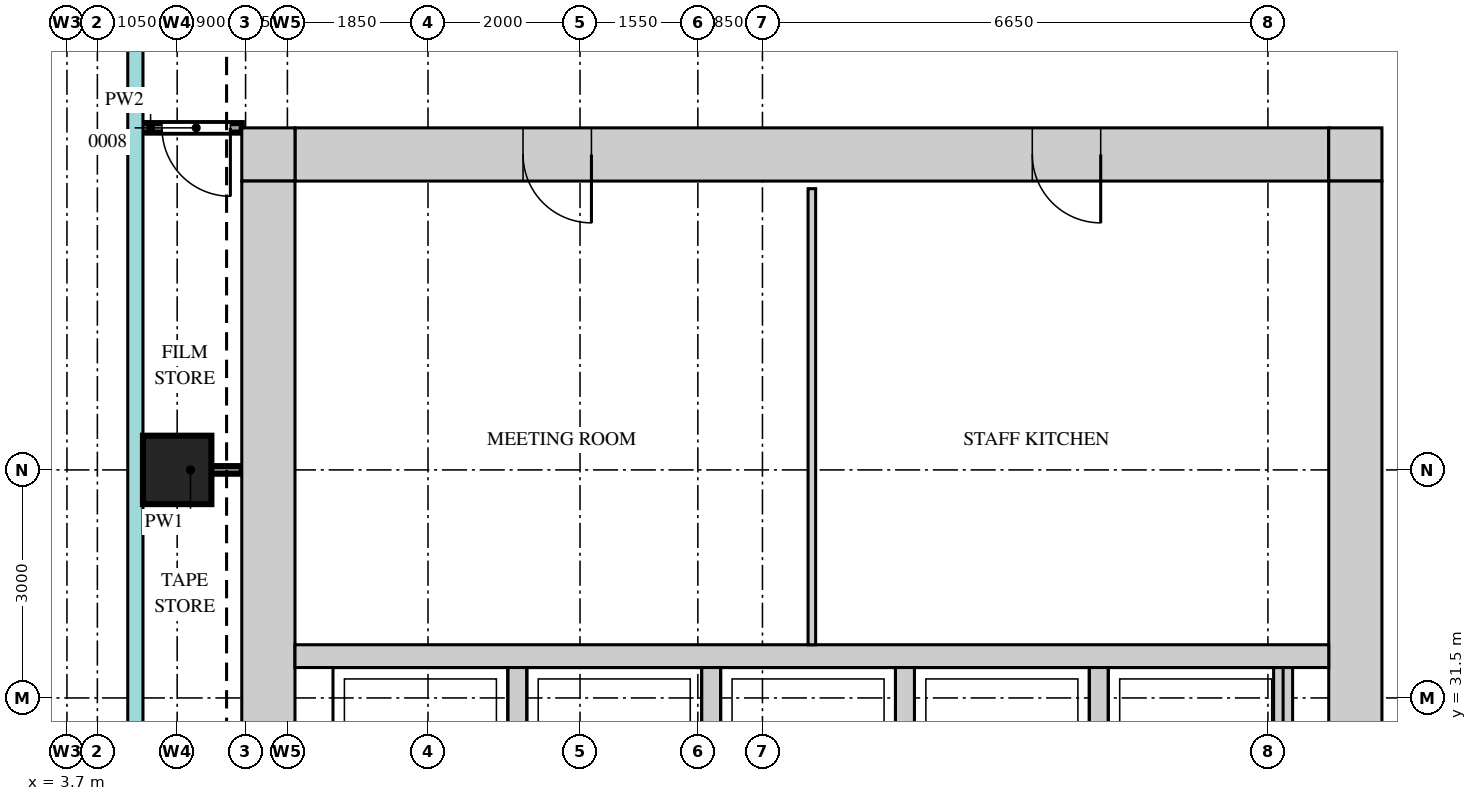
"""IFC4 building model, lengths in metres.
Left out: names, types, materials, properties, quantities, classifications, styles, units other than length and angle.
Written with IfcOpenShell. Run it as: python <this file> out.ifc"""

import sys

from ifc_helpers import new_model, si_unit, direction, frame, frame_2d, origin, origin_2d, place, context, subcontext, project, spatial, rectangle, extrude, source, transform, mapped, element, fill, save


model = new_model("IFC4")
c1 = context("Model", 3, precision=1e-05, world=origin(), true_north=direction((0.0, 1.0)))
c2 = subcontext(c1, "Body", "Model", "MODEL_VIEW")
j1 = project(units=[si_unit("LENGTHUNIT", "METRE"), si_unit("PLANEANGLEUNIT", "RADIAN")], contexts=[c1])
p1 = place(None, origin())
s1 = spatial("IfcSite", under=j1, at=p1, CompositionType="ELEMENT")
p2 = place(p1, origin())
s2 = spatial("IfcBuilding", under=s1, at=p2, CompositionType="ELEMENT")
p3 = place(p2, frame((0.0, 0.0, 254.2)))
s3 = spatial("IfcBuildingStorey", under=s2, at=p3, CompositionType="ELEMENT", Elevation=254.2)
m1 = source(origin(), c2, "Body", "SweptSolid", [
    extrude(rectangle(XDim=13.6, YDim=0.7, at=frame_2d((6.8, 0.0))), origin(), (0.0, 0.0, 1.0), 3.75),
])
p4 = place(p3, frame((6.7, 38.65, 0.0), z_axis=(0.0, 0.0, 1.0), x_axis=(1.0, 0.0, 0.0)))
e1 = element("IfcWall", 1, at=p4, inside=s3, PredefinedType="SHEAR", context=c2, shape_type="MappedRepresentation", body=[
    mapped(m1, transform((0.0, 0.0, 0.0))),
])
m2 = source(origin(), c2, "Body", "SweptSolid", [
    extrude(rectangle(XDim=0.9, YDim=2.1, at=frame_2d((0.45, 1.05))), frame((0.0, 0.36, 0.0), z_axis=(0.0, -1.0, 0.0), x_axis=(1.0, 0.0, 0.0)), (0.0, 0.0, 1.0), 0.72),
])
p5 = place(p4, frame((3.0, 0.0, 0.0)))
e2 = element("IfcOpeningElement", 2, at=p5, cuts=e1, PredefinedType="OPENING", context=c2, shape_type="MappedRepresentation", body=[
    mapped(m2, transform((0.0, 0.0, 0.0))),
])
p6 = place(p4, frame((9.7, 0.0, 0.0)))
e3 = element("IfcOpeningElement", 3, at=p6, cuts=e1, PredefinedType="OPENING", context=c2, shape_type="MappedRepresentation", body=[
    mapped(m2, transform((0.0, 0.0, 0.0))),
])
m3 = source(origin(), c2, "Body", "SweptSolid", [
    extrude(rectangle(XDim=0.7, YDim=0.7, at=frame_2d((0.35, 0.0))), origin(), (0.0, 0.0, 1.0), 3.75),
])
for number, where, z_axis, x_axis in (
    (4, (20.3, 38.65, 0.0), (0.0, 0.0, 1.0), (1.0, 0.0, 0.0)),
    (5, (6.0, 38.65, 0.0), (0.0, 0.0, 1.0), (1.0, 0.0, 0.0)),
):
    element("IfcWall", number, at=place(p3, frame(where, z_axis=z_axis, x_axis=x_axis)), inside=s3, PredefinedType="SHEAR", context=c2, shape_type="MappedRepresentation", body=[
        mapped(m3, transform((0.0, 0.0, 0.0))),
    ])
m4 = source(origin(), c2, "Body", "SweptSolid", [
    extrude(rectangle(XDim=22.6, YDim=0.7, at=frame_2d((11.3, 0.0))), origin(), (0.0, 0.0, 1.0), 3.75),
])
p7 = place(p3, frame((20.65, 15.7, 0.0), z_axis=(0.0, 0.0, 1.0), x_axis=(0.0, 1.0, 0.0)))
e6 = element("IfcWall", 6, at=p7, inside=s3, PredefinedType="SHEAR", context=c2, shape_type="MappedRepresentation", body=[
    mapped(m4, transform((0.0, 0.0, 0.0))),
])
m5 = source(origin(), c2, "Body", "SweptSolid", [
    extrude(rectangle(XDim=1.8, YDim=2.1, at=frame_2d((0.9, 1.05))), frame((0.0, 0.36, 0.0), z_axis=(0.0, -1.0, 0.0), x_axis=(1.0, 0.0, 0.0)), (0.0, 0.0, 1.0), 0.72),
])
p8 = place(p7, frame((10.8, 0.0, 0.0)))
e7 = element("IfcOpeningElement", 7, at=p8, cuts=e6, PredefinedType="OPENING", context=c2, shape_type="MappedRepresentation", body=[
    mapped(m5, transform((0.0, 0.0, 0.0))),
])
p9 = place(p7, frame((0.45, 0.0, 0.0)))
e8 = element("IfcOpeningElement", 8, at=p9, cuts=e6, PredefinedType="OPENING", context=c2, shape_type="MappedRepresentation", body=[
    mapped(m2, transform((0.0, 0.0, 0.0))),
])
p10 = place(p7, frame((2.9, 0.0, 0.0)))
e9 = element("IfcOpeningElement", 9, at=p10, cuts=e6, PredefinedType="OPENING", context=c2, shape_type="MappedRepresentation", body=[
    mapped(m2, transform((0.0, 0.0, 0.0))),
])
p11 = place(p7, frame((5.65, 0.0, 0.0)))
e10 = element("IfcOpeningElement", 10, at=p11, cuts=e6, PredefinedType="OPENING", context=c2, shape_type="MappedRepresentation", body=[
    mapped(m2, transform((0.0, 0.0, 0.0))),
])
p12 = place(p3, frame((6.35, 15.7, 0.0), z_axis=(0.0, 0.0, 1.0), x_axis=(0.0, 1.0, 0.0)))
e11 = element("IfcWall", 11, at=p12, inside=s3, PredefinedType="SHEAR", context=c2, shape_type="MappedRepresentation", body=[
    mapped(m4, transform((0.0, 0.0, 0.0))),
])
m6 = source(origin(), c2, "Body", "SweptSolid", [
    extrude(rectangle(XDim=13.6, YDim=0.3, at=frame_2d((6.8, 0.0))), origin(), (0.0, 0.0, 1.0), 3.75),
])
p13 = place(p3, frame((6.7, 32.05, 0.0), z_axis=(0.0, 0.0, 1.0), x_axis=(1.0, 0.0, 0.0)))
e12 = element("IfcWall", 12, at=p13, inside=s3, PredefinedType="STANDARD", context=c2, shape_type="MappedRepresentation", body=[
    mapped(m6, transform((0.0, 0.0, 0.0))),
])
m7 = source(origin(), c2, "Body", "SweptSolid", [
    extrude(rectangle(XDim=2.4, YDim=0.25, at=frame_2d((1.2, 0.0))), origin(), (0.0, 0.0, 1.0), 3.75),
])
for number, where, z_axis, x_axis in (
    (13, (17.275, 29.5, 0.0), (0.0, 0.0, 1.0), (0.0, 1.0, 0.0)),
    (14, (19.7, 29.5, 0.0), (0.0, 0.0, 1.0), (0.0, 1.0, 0.0)),
    (15, (9.625, 29.5, 0.0), (0.0, 0.0, 1.0), (0.0, 1.0, 0.0)),
    (16, (12.175, 29.5, 0.0), (0.0, 0.0, 1.0), (0.0, 1.0, 0.0)),
    (17, (14.725, 29.5, 0.0), (0.0, 0.0, 1.0), (0.0, 1.0, 0.0)),
):
    element("IfcWall", number, at=place(p3, frame(where, z_axis=z_axis, x_axis=x_axis)), inside=s3, PredefinedType="STANDARD", context=c2, shape_type="MappedRepresentation", body=[
        mapped(m7, transform((0.0, 0.0, 0.0))),
    ])
m8 = source(origin(), c2, "Body", "SweptSolid", [
    extrude(rectangle(XDim=0.9, YDim=0.9, at=origin_2d()), origin(), (0.0, 0.0, 1.0), 3.75),
])
p14 = place(p3, frame((5.15, 34.5, 0.0), z_axis=(0.0, 0.0, 1.0), x_axis=(1.0, 0.0, 0.0)))
e18 = element("IfcColumn", 18, at=p14, inside=s3, PredefinedType="COLUMN", context=c2, shape_type="MappedRepresentation", body=[
    mapped(m8, transform((0.0, 0.0, 0.0))),
])
m9 = source(origin(), c2, "Body", "SweptSolid", [
    extrude(rectangle(XDim=6.0, YDim=0.1, at=frame_2d((3.0, 0.0))), origin(), (0.0, 0.0, 1.0), 3.8),
])
p15 = place(p3, frame((13.5, 32.2, 0.0), z_axis=(0.0, 0.0, 1.0), x_axis=(0.0, 1.0, 0.0)))
e19 = element("IfcWall", 19, at=p15, inside=s3, PredefinedType="PARTITIONING", context=c2, shape_type="MappedRepresentation", body=[
    mapped(m9, transform((0.0, 0.0, 0.0))),
])
m10 = source(origin(), c2, "Body", "SweptSolid", [
    extrude(rectangle(XDim=1.35, YDim=0.1, at=frame_2d((0.675, 0.0))), origin(), (0.0, 0.0, 1.0), 3.8),
])
p16 = place(p3, frame((4.65, 34.5, 0.0), z_axis=(0.0, 0.0, 1.0), x_axis=(1.0, 0.0, 0.0)))
e20 = element("IfcWall", 20, at=p16, inside=s3, PredefinedType="PARTITIONING", context=c2, shape_type="MappedRepresentation", body=[
    mapped(m10, transform((0.0, 0.0, 0.0))),
])
m11 = source(origin(), c2, "Body", "SweptSolid", [
    extrude(rectangle(XDim=1.35, YDim=0.125, at=frame_2d((0.675, 0.0))), origin(), (0.0, 0.0, 1.0), 3.8),
])
p17 = place(p3, frame((4.65, 39.0, 0.0), z_axis=(0.0, 0.0, 1.0), x_axis=(1.0, 0.0, 0.0)))
e21 = element("IfcWall", 21, at=p17, inside=s3, PredefinedType="PARTITIONING", context=c2, shape_type="MappedRepresentation", body=[
    mapped(m11, transform((0.0, 0.0, 0.0))),
])
m12 = source(origin(), c2, "Body", "SweptSolid", [
    extrude(rectangle(XDim=0.9, YDim=2.1, at=frame_2d((0.45, 1.05))), frame((0.0, 0.073, 0.0), z_axis=(0.0, -1.0, 0.0), x_axis=(1.0, 0.0, 0.0)), (0.0, 0.0, 1.0), 0.145),
])
p18 = place(p17, frame((0.3, 0.0, 0.0)))
e22 = element("IfcOpeningElement", 22, at=p18, cuts=e21, PredefinedType="OPENING", context=c2, shape_type="MappedRepresentation", body=[
    mapped(m12, transform((0.0, 0.0, 0.0))),
])
m13 = source(origin(), c2, "Body", "SweptSolid", [
    extrude(rectangle(XDim=0.9, YDim=2.1, at=frame_2d((0.45, 1.05))), frame((0.0, 0.3, 0.0), z_axis=(0.0, -1.0, 0.0), x_axis=(1.0, 0.0, 0.0)), (0.0, 0.0, 1.0), 0.6),
])
p19 = place(p5, origin())
e23 = element("IfcDoor", 23, at=p19, inside=s3, OperationType="SINGLE_SWING_RIGHT", PredefinedType="DOOR", context=c2, shape_type="MappedRepresentation", body=[
    mapped(m13, transform((0.0, 0.0, 0.0))),
])
fill(e2, e23)
p20 = place(p6, origin())
e24 = element("IfcDoor", 24, at=p20, inside=s3, OperationType="SINGLE_SWING_RIGHT", PredefinedType="DOOR", context=c2, shape_type="MappedRepresentation", body=[
    mapped(m13, transform((0.0, 0.0, 0.0))),
])
fill(e3, e24)
m14 = source(origin(), c2, "Body", "SweptSolid", [
    extrude(rectangle(XDim=0.9, YDim=2.1, at=frame_2d((0.45, 1.05))), frame((0.0, 0.025, 0.0), z_axis=(0.0, -1.0, 0.0), x_axis=(1.0, 0.0, 0.0)), (0.0, 0.0, 1.0), 0.05),
])
p21 = place(p18, origin())
e25 = element("IfcDoor", 25, at=p21, inside=s3, OperationType="SINGLE_SWING_RIGHT", PredefinedType="DOOR", context=c2, shape_type="MappedRepresentation", body=[
    mapped(m14, transform((0.0, 0.0, 0.0))),
])
fill(e22, e25)
save(model, sys.argv[1])
